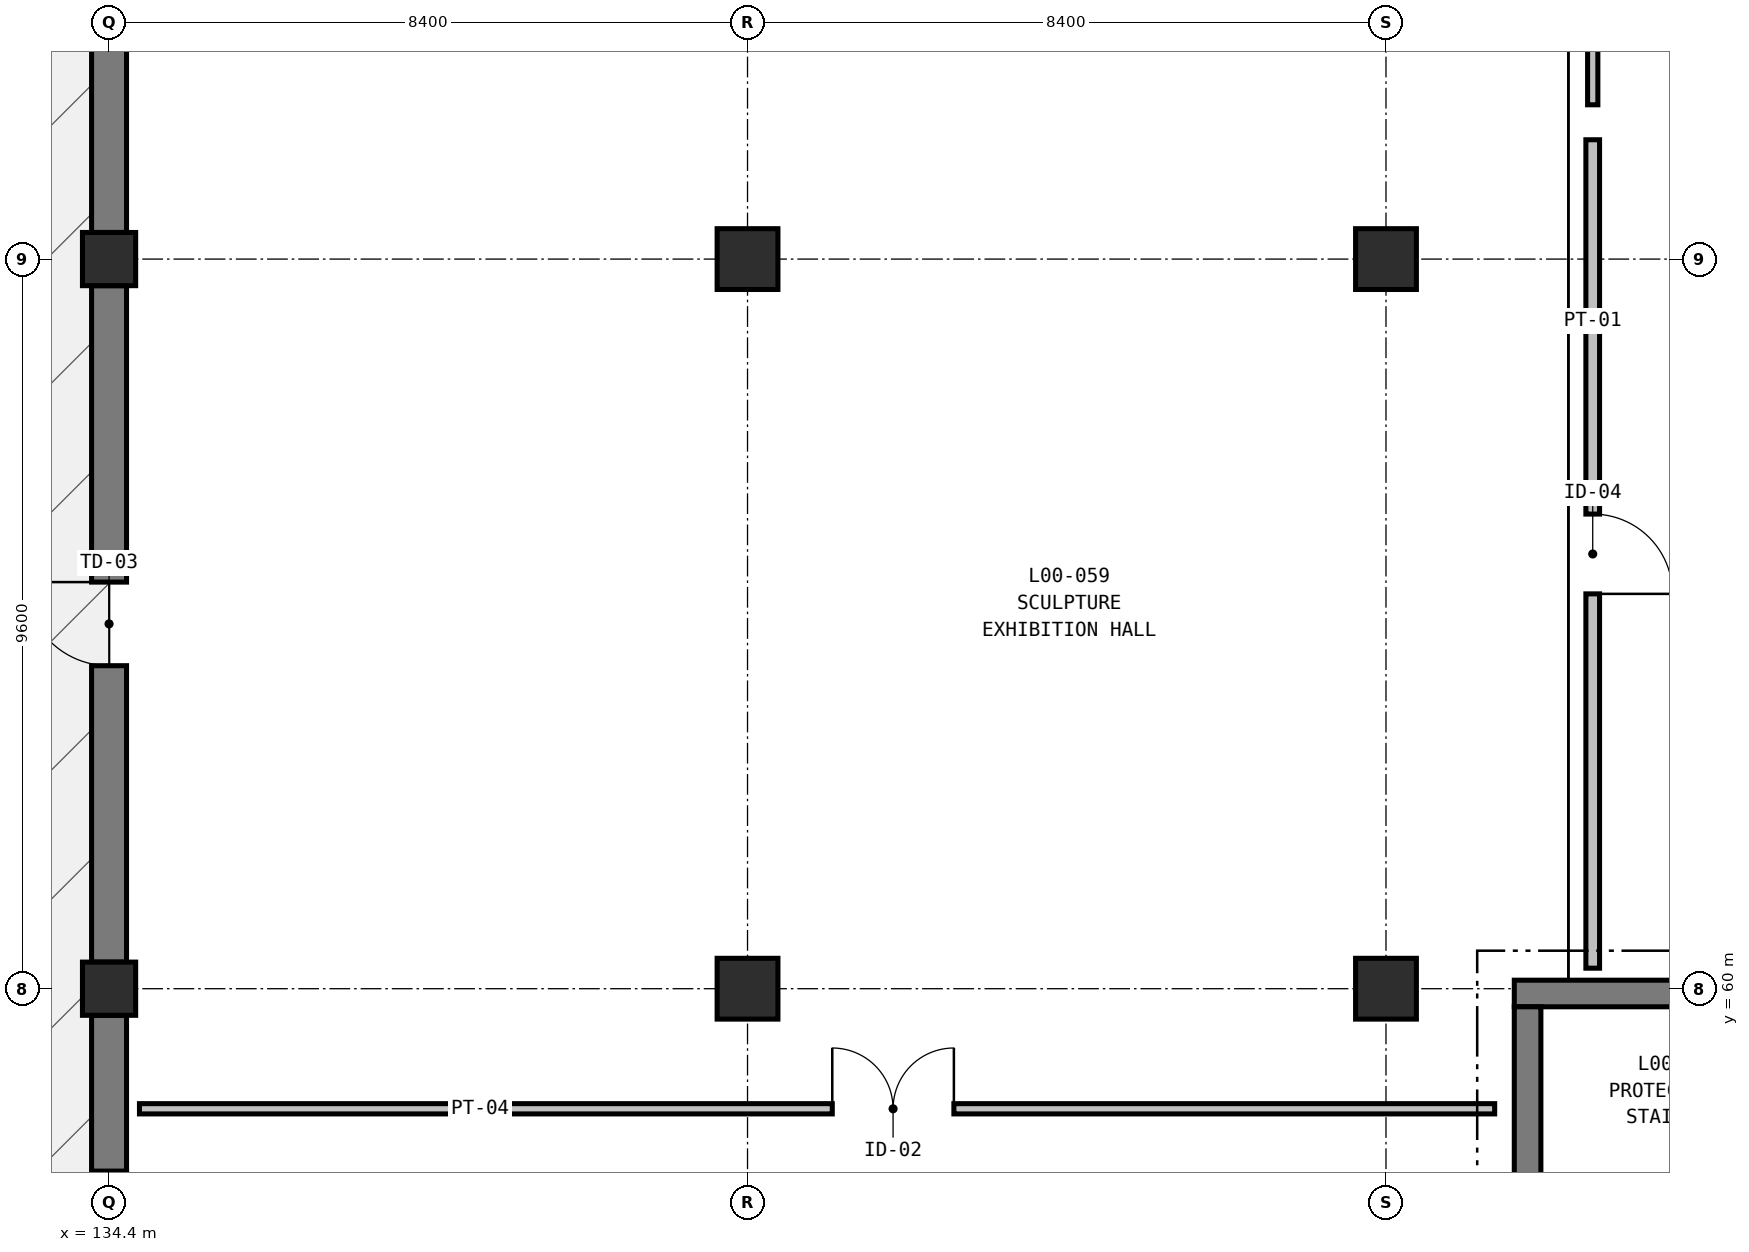
"""IFC4 building model, lengths in metres.
Left out: names, types, materials, properties, quantities, classifications, styles, units other than length and angle.
Written with IfcOpenShell. Run it as: python <this file> out.ifc"""

import sys

from ifc_helpers import new_model, si_unit, direction, frame, frame_2d, origin, origin_2d, place, context, subcontext, project, spatial, rectangle, extrude, element, fill, save


model = new_model("IFC4")
c1 = context("Model", 3, precision=1e-05, world=origin(), true_north=direction((0.0, 1.0)))
c2 = subcontext(c1, "Body", "Model", "MODEL_VIEW")
j1 = project(units=[si_unit("LENGTHUNIT", "METRE"), si_unit("PLANEANGLEUNIT", "RADIAN")], contexts=[c1])
p1 = place(None, origin())
s1 = spatial("IfcSite", under=j1, at=p1, CompositionType="ELEMENT")
p2 = place(p1, origin())
s2 = spatial("IfcBuilding", under=s1, at=p2, CompositionType="ELEMENT")
p3 = place(p2, origin())
s3 = spatial("IfcBuildingStorey", under=s2, at=p3, CompositionType="ELEMENT", Elevation=0.0)
for number, where, z_axis, x_axis in (
    (1, (134.4, 60.0, 0.0), (0.0, 0.0, 1.0), (1.0, 0.0, 0.0)),
    (2, (134.4, 69.6, 0.0), (0.0, 0.0, 1.0), (1.0, 0.0, 0.0)),
):
    element("IfcColumn", number, at=place(p3, frame(where, z_axis=z_axis, x_axis=x_axis)), inside=s3, PredefinedType="COLUMN", context=c2, shape_type="SweptSolid", body=[
        extrude(rectangle(XDim=0.7, YDim=0.7, at=origin_2d()), origin(), (0.0, 0.0, 1.0), 6.0),
    ])
for number, where, z_axis, x_axis in (
    (3, (142.8, 60.0, 0.0), (0.0, 0.0, 1.0), (1.0, 0.0, 0.0)),
    (4, (142.8, 69.6, 0.0), (0.0, 0.0, 1.0), (1.0, 0.0, 0.0)),
    (5, (151.2, 60.0, 0.0), (0.0, 0.0, 1.0), (1.0, 0.0, 0.0)),
    (6, (151.2, 69.6, 0.0), (0.0, 0.0, 1.0), (1.0, 0.0, 0.0)),
):
    element("IfcColumn", number, at=place(p3, frame(where, z_axis=z_axis, x_axis=x_axis)), inside=s3, PredefinedType="COLUMN", context=c2, shape_type="SweptSolid", body=[
        extrude(rectangle(XDim=0.8, YDim=0.8, at=origin_2d()), origin(), (0.0, 0.0, 1.0), 6.0),
    ])
p4 = place(p3, frame((134.4, 50.75, 0.0), z_axis=(0.0, 0.0, 1.0), x_axis=(0.0, 1.0, 0.0)))
e7 = element("IfcWall", 7, at=p4, inside=s3, PredefinedType="SOLIDWALL", context=c2, shape_type="SweptSolid", body=[
    extrude(rectangle(XDim=6.85, YDim=0.46, at=frame_2d((3.425, 0.0))), origin(), (0.0, 0.0, 1.0), 5.68),
])
p5 = place(p4, frame((2.325, 0.0, 0.0)))
e8 = element("IfcOpeningElement", 8, at=p5, cuts=e7, PredefinedType="OPENING", context=c2, shape_type="SweptSolid", body=[
    extrude(rectangle(XDim=2.2, YDim=2.4, at=frame_2d((1.1, 1.2))), frame((0.0, 0.24, 0.0), z_axis=(0.0, -1.0, 0.0), x_axis=(1.0, 0.0, 0.0)), (0.0, 0.0, 1.0), 0.48),
])
p6 = place(p3, frame((134.4, 57.6, 0.0), z_axis=(0.0, 0.0, 1.0), x_axis=(0.0, 1.0, 0.0)))
e9 = element("IfcWall", 9, at=p6, inside=s3, PredefinedType="SOLIDWALL", context=c2, shape_type="SweptSolid", body=[
    extrude(rectangle(XDim=2.05, YDim=0.46, at=frame_2d((1.025, 0.0))), origin(), (0.0, 0.0, 1.0), 5.68),
])
p7 = place(p3, frame((134.4, 60.35, 0.0), z_axis=(0.0, 0.0, 1.0), x_axis=(0.0, 1.0, 0.0)))
e10 = element("IfcWall", 10, at=p7, inside=s3, PredefinedType="SOLIDWALL", context=c2, shape_type="SweptSolid", body=[
    extrude(rectangle(XDim=8.9, YDim=0.46, at=frame_2d((4.45, 0.0))), origin(), (0.0, 0.0, 1.0), 5.68),
])
p8 = place(p7, frame((3.9, 0.0, 0.0)))
e11 = element("IfcOpeningElement", 11, at=p8, cuts=e10, PredefinedType="OPENING", context=c2, shape_type="SweptSolid", body=[
    extrude(rectangle(XDim=1.1, YDim=2.2, at=frame_2d((0.55, 1.1))), frame((0.0, 0.24, 0.0), z_axis=(0.0, -1.0, 0.0), x_axis=(1.0, 0.0, 0.0)), (0.0, 0.0, 1.0), 0.48),
])
p9 = place(p3, frame((134.4, 69.95, 0.0), z_axis=(0.0, 0.0, 1.0), x_axis=(0.0, 1.0, 0.0)))
e12 = element("IfcWall", 12, at=p9, inside=s3, PredefinedType="SOLIDWALL", context=c2, shape_type="SweptSolid", body=[
    extrude(rectangle(XDim=8.9, YDim=0.46, at=frame_2d((4.45, 0.0))), origin(), (0.0, 0.0, 1.0), 5.68),
])
p10 = place(p9, frame((3.825, 0.0, 0.0)))
e13 = element("IfcOpeningElement", 13, at=p10, cuts=e12, PredefinedType="OPENING", context=c2, shape_type="SweptSolid", body=[
    extrude(rectangle(XDim=1.25, YDim=2.25, at=frame_2d((0.625, 1.125))), frame((0.0, 0.24, 0.0), z_axis=(0.0, -1.0, 0.0), x_axis=(1.0, 0.0, 0.0)), (0.0, 0.0, 1.0), 0.48),
])
p11 = place(p3, frame((152.888, 59.937, 0.0), z_axis=(0.0, 0.0, 1.0), x_axis=(1.0, 0.0, 0.0)))
e14 = element("IfcWall", 14, at=p11, inside=s3, PredefinedType="SHEAR", context=c2, shape_type="SweptSolid", body=[
    extrude(rectangle(XDim=4.624, YDim=0.35, at=frame_2d((2.312, 0.0))), origin(), (0.0, 0.0, 1.0), 5.68),
])
p12 = place(p3, frame((153.063, 50.638, 0.0), z_axis=(0.0, 0.0, 1.0), x_axis=(0.0, 1.0, 0.0)))
e15 = element("IfcWall", 15, at=p12, inside=s3, PredefinedType="SHEAR", context=c2, shape_type="SweptSolid", body=[
    extrude(rectangle(XDim=9.124, YDim=0.35, at=frame_2d((4.562, 0.0))), origin(), (0.0, 0.0, 1.0), 5.68),
])
p13 = place(p3, frame((134.8, 58.42, 0.0), z_axis=(0.0, 0.0, 1.0), x_axis=(1.0, 0.0, 0.0)))
e16 = element("IfcWall", 16, at=p13, inside=s3, PredefinedType="PARTITIONING", context=c2, shape_type="SweptSolid", body=[
    extrude(rectangle(XDim=17.83, YDim=0.135, at=frame_2d((8.915, 0.0))), origin(), (0.0, 0.0, 1.0), 4.855),
])
p14 = place(p13, frame((9.115, 0.0, 0.0)))
e17 = element("IfcOpeningElement", 17, at=p14, cuts=e16, PredefinedType="OPENING", context=c2, shape_type="SweptSolid", body=[
    extrude(rectangle(XDim=1.6, YDim=2.35, at=frame_2d((0.8, 1.175))), frame((0.0, 0.077, 0.0), z_axis=(0.0, -1.0, 0.0), x_axis=(1.0, 0.0, 0.0)), (0.0, 0.0, 1.0), 0.155),
])
p15 = place(p3, frame((153.92, 71.17, 0.0), z_axis=(0.0, 0.0, 1.0), x_axis=(0.0, -1.0, 0.0)))
e18 = element("IfcWall", 18, at=p15, inside=s3, PredefinedType="PARTITIONING", context=c2, shape_type="SweptSolid", body=[
    extrude(rectangle(XDim=10.9, YDim=0.18, at=frame_2d((5.45, 0.0))), origin(), (0.0, 0.0, 1.0), 5.005),
])
p16 = place(p15, frame((4.925, 0.0, 0.0)))
e19 = element("IfcOpeningElement", 19, at=p16, cuts=e18, PredefinedType="OPENING", context=c2, shape_type="SweptSolid", body=[
    extrude(rectangle(XDim=1.05, YDim=2.2, at=frame_2d((0.525, 1.1))), frame((0.0, 0.1, 0.0), z_axis=(0.0, -1.0, 0.0), x_axis=(1.0, 0.0, 0.0)), (0.0, 0.0, 1.0), 0.2),
])
p17 = place(p3, frame((153.92, 84.07, 0.0), z_axis=(0.0, 0.0, 1.0), x_axis=(0.0, -1.0, 0.0)))
e20 = element("IfcWall", 20, at=p17, inside=s3, PredefinedType="PARTITIONING", context=c2, shape_type="SweptSolid", body=[
    extrude(rectangle(XDim=12.44, YDim=0.135, at=frame_2d((6.22, 0.0))), origin(), (0.0, 0.0, 1.0), 5.005),
])
p18 = place(p17, frame((5.02, 0.0, 0.0)))
e21 = element("IfcOpeningElement", 21, at=p18, cuts=e20, PredefinedType="OPENING", context=c2, shape_type="SweptSolid", body=[
    extrude(rectangle(XDim=2.4, YDim=2.6, at=frame_2d((1.2, 1.3))), frame((0.0, 0.077, 0.0), z_axis=(0.0, -1.0, 0.0), x_axis=(1.0, 0.0, 0.0)), (0.0, 0.0, 1.0), 0.155),
])
p19 = place(p8, origin())
e22 = element("IfcDoor", 22, at=p19, inside=s3, OperationType="SINGLE_SWING_RIGHT", PredefinedType="DOOR", context=c2, shape_type="SweptSolid", body=[
    extrude(rectangle(XDim=1.1, YDim=2.2, at=frame_2d((0.55, 1.1))), frame((0.0, 0.025, 0.0), z_axis=(0.0, -1.0, 0.0), x_axis=(1.0, 0.0, 0.0)), (0.0, 0.0, 1.0), 0.05),
])
fill(e11, e22)
p20 = place(p14, origin())
e23 = element("IfcDoor", 23, at=p20, inside=s3, OperationType="DOUBLE_DOOR_SINGLE_SWING", PredefinedType="DOOR", context=c2, shape_type="SweptSolid", body=[
    extrude(rectangle(XDim=1.6, YDim=2.35, at=frame_2d((0.8, 1.175))), frame((0.0, 0.025, 0.0), z_axis=(0.0, -1.0, 0.0), x_axis=(1.0, 0.0, 0.0)), (0.0, 0.0, 1.0), 0.05),
])
fill(e17, e23)
p21 = place(p16, origin())
e24 = element("IfcDoor", 24, at=p21, inside=s3, OperationType="SINGLE_SWING_RIGHT", PredefinedType="DOOR", context=c2, shape_type="SweptSolid", body=[
    extrude(rectangle(XDim=1.05, YDim=2.2, at=frame_2d((0.525, 1.1))), frame((0.0, 0.025, 0.0), z_axis=(0.0, -1.0, 0.0), x_axis=(1.0, 0.0, 0.0)), (0.0, 0.0, 1.0), 0.05),
])
fill(e19, e24)
save(model, sys.argv[1])
